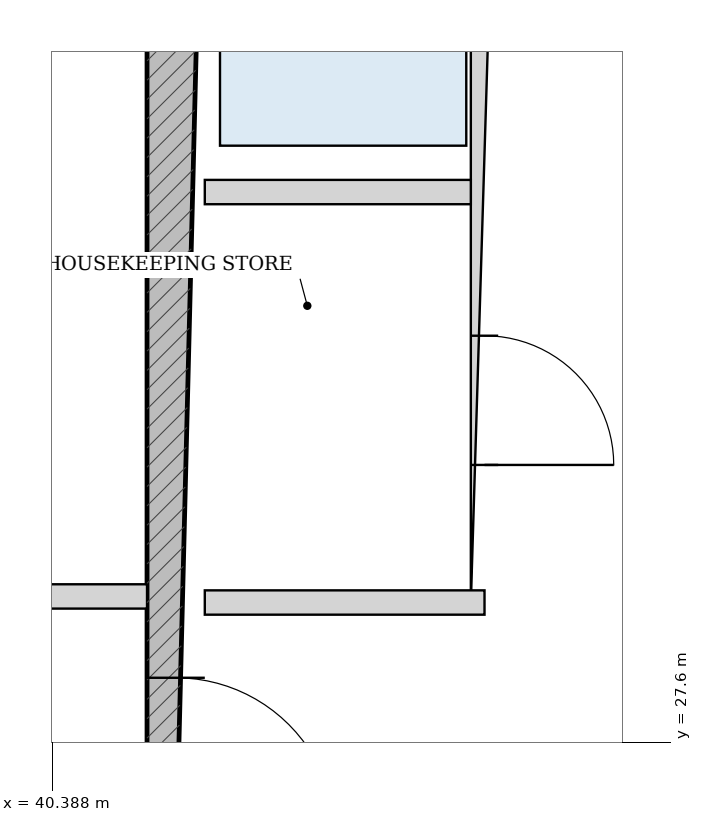
"""IFC4 building model, lengths in metres.
Left out: names, types, materials, properties, quantities, classifications, styles, units other than length and angle.
Written with IfcOpenShell. Run it as: python <this file> out.ifc"""

import sys

from ifc_helpers import new_model, si_unit, direction, frame, frame_2d, origin, place, context, subcontext, project, spatial, rectangle, extrude, source, transform, mapped, element, fill, save


model = new_model("IFC4")
c1 = context("Model", 3, precision=1e-05, world=origin(), true_north=direction((-0.2419218956, 0.970295726276)))
c2 = subcontext(c1, "Body", "Model", "MODEL_VIEW")
j1 = project(units=[si_unit("LENGTHUNIT", "METRE"), si_unit("PLANEANGLEUNIT", "RADIAN")], contexts=[c1])
p1 = place(None, origin())
s1 = spatial("IfcSite", under=j1, at=p1, CompositionType="ELEMENT")
p2 = place(p1, origin())
s2 = spatial("IfcBuilding", under=s1, at=p2, CompositionType="ELEMENT")
p3 = place(p2, frame((0.0, 0.0, 142.6)))
s3 = spatial("IfcBuildingStorey", under=s2, at=p3, CompositionType="ELEMENT", Elevation=142.6)
p4 = place(p3, frame((41.2, 19.175, 0.0), z_axis=(0.0, 0.0, 1.0), x_axis=(0.0, 1.0, 0.0)))
e1 = element("IfcWall", 1, at=p4, inside=s3, PredefinedType="SHEAR", context=c2, shape_type="SweptSolid", body=[
    extrude(rectangle(XDim=15.25, YDim=0.38, at=frame_2d((7.625, 0.0))), origin(), (0.0, 0.0, 1.0), 3.33),
])
p5 = place(p4, frame((7.8, 0.0, 0.0)))
e2 = element("IfcOpeningElement", 2, at=p5, cuts=e1, PredefinedType="OPENING", context=c2, shape_type="SweptSolid", body=[
    extrude(rectangle(XDim=1.05, YDim=2.15, at=frame_2d((0.525, 1.075))), frame((0.0, 0.2, 0.0), z_axis=(0.0, -1.0, 0.0), x_axis=(1.0, 0.0, 0.0)), (0.0, 0.0, 1.0), 0.4),
])
p6 = place(p3, frame((43.23, 28.52, 0.0), z_axis=(0.0, 0.0, 1.0), x_axis=(0.0, 1.0, 0.0)))
e3 = element("IfcWall", 3, at=p6, inside=s3, PredefinedType="PARTITIONING", context=c2, shape_type="SweptSolid", body=[
    extrude(rectangle(XDim=5.905, YDim=0.18, at=frame_2d((2.953, 0.0))), origin(), (0.0, 0.0, 1.0), 3.33),
])
p7 = place(p6, frame((0.905, 0.0, 0.0)))
e4 = element("IfcOpeningElement", 4, at=p7, cuts=e3, PredefinedType="OPENING", context=c2, shape_type="SweptSolid", body=[
    extrude(rectangle(XDim=0.85, YDim=2.1, at=frame_2d((0.425, 1.05))), frame((0.0, 0.1, 0.0), z_axis=(0.0, -1.0, 0.0), x_axis=(1.0, 0.0, 0.0)), (0.0, 0.0, 1.0), 0.2),
])
p8 = place(p6, frame((3.655, 0.0, 0.0)))
e5 = element("IfcOpeningElement", 5, at=p8, cuts=e3, PredefinedType="OPENING", context=c2, shape_type="SweptSolid", body=[
    extrude(rectangle(XDim=1.15, YDim=2.2, at=frame_2d((0.575, 1.1))), frame((0.0, 0.1, 0.0), z_axis=(0.0, -1.0, 0.0), x_axis=(1.0, 0.0, 0.0)), (0.0, 0.0, 1.0), 0.2),
])
p9 = place(p3, frame((41.39, 31.22, 0.0), z_axis=(0.0, 0.0, 1.0), x_axis=(1.0, 0.0, 0.0)))
e6 = element("IfcWall", 6, at=p9, inside=s3, PredefinedType="PARTITIONING", context=c2, shape_type="SweptSolid", body=[
    extrude(rectangle(XDim=1.75, YDim=0.16, at=frame_2d((0.875, 0.0))), origin(), (0.0, 0.0, 1.0), 3.33),
])
p10 = place(p3, frame((41.39, 28.52, 0.0), z_axis=(0.0, 0.0, 1.0), x_axis=(1.0, 0.0, 0.0)))
e7 = element("IfcWall", 7, at=p10, inside=s3, PredefinedType="PARTITIONING", context=c2, shape_type="SweptSolid", body=[
    extrude(rectangle(XDim=1.84, YDim=0.16, at=frame_2d((0.92, 0.0))), origin(), (0.0, 0.0, 1.0), 3.33),
])
p11 = place(p3, frame((34.99, 28.56, 0.0), z_axis=(0.0, 0.0, 1.0), x_axis=(1.0, 0.0, 0.0)))
e8 = element("IfcWall", 8, at=p11, inside=s3, PredefinedType="PARTITIONING", context=c2, shape_type="SweptSolid", body=[
    extrude(rectangle(XDim=6.02, YDim=0.16, at=frame_2d((3.01, 0.0))), origin(), (0.0, 0.0, 1.0), 3.33),
])
p12 = place(p11, frame((1.025, 0.0, 0.0)))
e9 = element("IfcOpeningElement", 9, at=p12, cuts=e8, PredefinedType="OPENING", context=c2, shape_type="SweptSolid", body=[
    extrude(rectangle(XDim=0.86, YDim=2.1, at=frame_2d((0.43, 1.05))), frame((0.0, 0.09, 0.0), z_axis=(0.0, -1.0, 0.0), x_axis=(1.0, 0.0, 0.0)), (0.0, 0.0, 1.0), 0.18),
])
p13 = place(p11, frame((4.14, 0.0, 0.0)))
e10 = element("IfcOpeningElement", 10, at=p13, cuts=e8, PredefinedType="OPENING", context=c2, shape_type="SweptSolid", body=[
    extrude(rectangle(XDim=0.85, YDim=2.1, at=frame_2d((0.425, 1.05))), frame((0.0, 0.09, 0.0), z_axis=(0.0, -1.0, 0.0), x_axis=(1.0, 0.0, 0.0)), (0.0, 0.0, 1.0), 0.18),
])
m1 = source(origin(), c2, "Body", "SweptSolid", [
    extrude(rectangle(XDim=1.05, YDim=2.15, at=frame_2d((0.525, 1.075))), frame((0.0, 0.025, 0.0), z_axis=(0.0, -1.0, 0.0), x_axis=(1.0, 0.0, 0.0)), (0.0, 0.0, 1.0), 0.05),
])
p14 = place(p5, frame((1.05, 0.0, 0.0), z_axis=(0.0, 0.0, 1.0), x_axis=(-1.0, 0.0, 0.0)))
e11 = element("IfcDoor", 11, at=p14, inside=s3, OperationType="SINGLE_SWING_RIGHT", PredefinedType="DOOR", context=c2, shape_type="MappedRepresentation", body=[
    mapped(m1, transform((0.0, 0.0, 0.0), scale=1.0)),
])
fill(e2, e11)
m2 = source(origin(), c2, "Body", "SweptSolid", [
    extrude(rectangle(XDim=0.85, YDim=2.1, at=frame_2d((0.425, 1.05))), frame((0.0, 0.025, 0.0), z_axis=(0.0, -1.0, 0.0), x_axis=(1.0, 0.0, 0.0)), (0.0, 0.0, 1.0), 0.05),
])
p15 = place(p7, frame((0.85, 0.0, 0.0), z_axis=(0.0, 0.0, 1.0), x_axis=(-1.0, 0.0, 0.0)))
e12 = element("IfcDoor", 12, at=p15, inside=s3, OperationType="SINGLE_SWING_RIGHT", PredefinedType="DOOR", context=c2, shape_type="MappedRepresentation", body=[
    mapped(m2, transform((0.0, 0.0, 0.0), scale=1.0)),
])
fill(e4, e12)
save(model, sys.argv[1])
